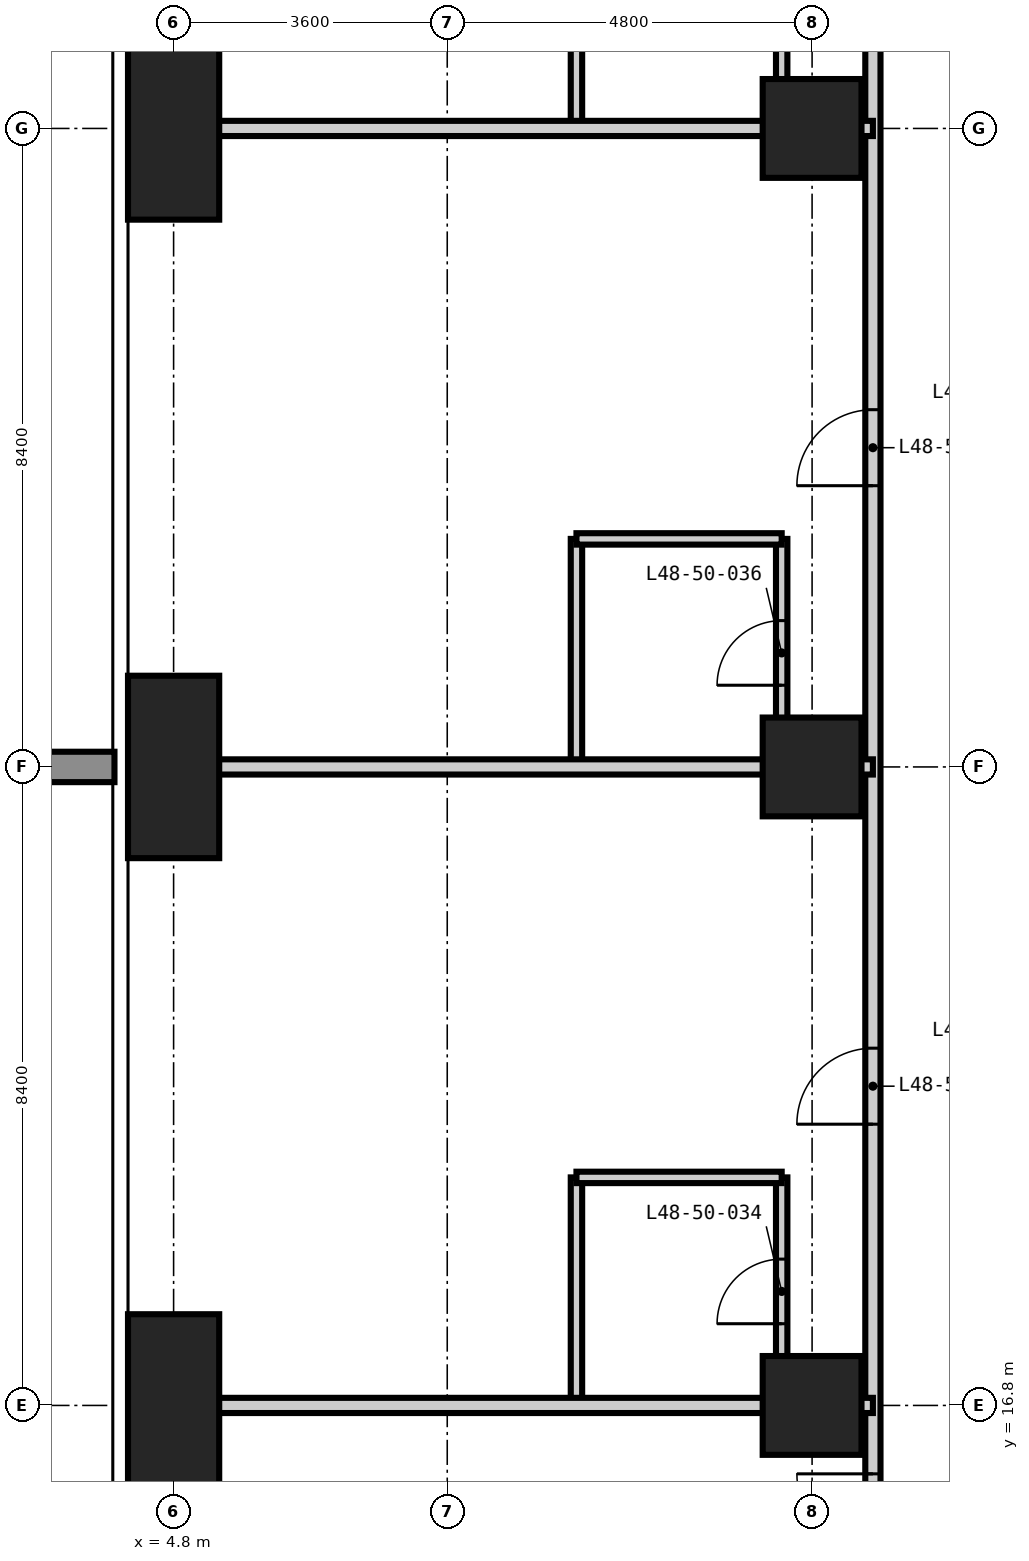
"""IFC4 building model, lengths in metres.
Left out: names, types, materials, properties, quantities, classifications, styles, units other than length and angle.
Written with IfcOpenShell. Run it as: python <this file> out.ifc"""

import sys

from ifc_helpers import new_model, si_unit, direction, frame, frame_2d, origin, origin_2d, place, context, subcontext, project, spatial, rectangle, extrude, element, fill, save


model = new_model("IFC4")
c1 = context("Model", 3, precision=1e-05, world=origin(), true_north=direction((0.0, 1.0)))
c2 = subcontext(c1, "Body", "Model", "MODEL_VIEW")
j1 = project(units=[si_unit("LENGTHUNIT", "METRE"), si_unit("PLANEANGLEUNIT", "RADIAN")], contexts=[c1])
p1 = place(None, origin())
s1 = spatial("IfcSite", under=j1, at=p1, CompositionType="ELEMENT")
p2 = place(p1, origin())
s2 = spatial("IfcBuilding", under=s1, at=p2, CompositionType="ELEMENT")
p3 = place(p2, frame((0.0, 0.0, 187.8)))
s3 = spatial("IfcBuildingStorey", under=s2, at=p3, CompositionType="ELEMENT", Elevation=187.8)
for number, where, z_axis, x_axis in (
    (1, (4.8, 16.8, -0.35), (0.0, 0.0, 1.0), (1.0, 0.0, 0.0)),
    (2, (4.8, 25.2, -0.35), (0.0, 0.0, 1.0), (1.0, 0.0, 0.0)),
    (3, (4.8, 33.6, -0.35), (0.0, 0.0, 1.0), (1.0, 0.0, 0.0)),
):
    element("IfcColumn", number, at=place(p3, frame(where, z_axis=z_axis, x_axis=x_axis)), inside=s3, PredefinedType="COLUMN", context=c2, shape_type="SweptSolid", body=[
        extrude(rectangle(XDim=1.2, YDim=2.4, at=origin_2d()), origin(), (0.0, 0.0, 1.0), 3.6),
    ])
for number, where, z_axis, x_axis in (
    (4, (13.2, 16.8, -0.35), (0.0, 0.0, 1.0), (1.0, 0.0, 0.0)),
    (5, (13.2, 25.2, -0.35), (0.0, 0.0, 1.0), (1.0, 0.0, 0.0)),
    (6, (13.2, 33.6, -0.35), (0.0, 0.0, 1.0), (1.0, 0.0, 0.0)),
):
    element("IfcColumn", number, at=place(p3, frame(where, z_axis=z_axis, x_axis=x_axis)), inside=s3, PredefinedType="COLUMN", context=c2, shape_type="SweptSolid", body=[
        extrude(rectangle(XDim=1.3, YDim=1.3, at=origin_2d()), origin(), (0.0, 0.0, 1.0), 3.6),
    ])
for number, where, z_axis, x_axis in (
    (7, (10.1, 16.8, 0.0), (0.0, 0.0, 1.0), (0.0, 1.0, 0.0)),
    (8, (10.1, 25.2, 0.0), (0.0, 0.0, 1.0), (0.0, 1.0, 0.0)),
    (9, (10.1, 33.6, 0.0), (0.0, 0.0, 1.0), (0.0, 1.0, 0.0)),
):
    element("IfcWall", number, at=place(p3, frame(where, z_axis=z_axis, x_axis=x_axis)), inside=s3, PredefinedType="PARTITIONING", context=c2, shape_type="SweptSolid", body=[
        extrude(rectangle(XDim=3.0, YDim=0.15, at=frame_2d((1.5, 0.0))), origin(), (0.0, 0.0, 1.0), 3.25),
    ])
p4 = place(p3, frame((12.8, 16.8, 0.0), z_axis=(0.0, 0.0, 1.0), x_axis=(0.0, 1.0, 0.0)))
e10 = element("IfcWall", 10, at=p4, inside=s3, PredefinedType="PARTITIONING", context=c2, shape_type="SweptSolid", body=[
    extrude(rectangle(XDim=3.0, YDim=0.15, at=frame_2d((1.5, 0.0))), origin(), (0.0, 0.0, 1.0), 3.25),
])
p5 = place(p4, frame((1.075, 0.0, 0.0)))
e11 = element("IfcOpeningElement", 11, at=p5, cuts=e10, PredefinedType="OPENING", context=c2, shape_type="SweptSolid", body=[
    extrude(rectangle(XDim=0.85, YDim=2.1, at=frame_2d((0.425, 1.05))), frame((0.0, 0.085, 0.0), z_axis=(0.0, -1.0, 0.0), x_axis=(1.0, 0.0, 0.0)), (0.0, 0.0, 1.0), 0.17),
])
p6 = place(p3, frame((12.8, 25.2, 0.0), z_axis=(0.0, 0.0, 1.0), x_axis=(0.0, 1.0, 0.0)))
e12 = element("IfcWall", 12, at=p6, inside=s3, PredefinedType="PARTITIONING", context=c2, shape_type="SweptSolid", body=[
    extrude(rectangle(XDim=3.0, YDim=0.15, at=frame_2d((1.5, 0.0))), origin(), (0.0, 0.0, 1.0), 3.25),
])
p7 = place(p6, frame((1.075, 0.0, 0.0)))
e13 = element("IfcOpeningElement", 13, at=p7, cuts=e12, PredefinedType="OPENING", context=c2, shape_type="SweptSolid", body=[
    extrude(rectangle(XDim=0.85, YDim=2.1, at=frame_2d((0.425, 1.05))), frame((0.0, 0.085, 0.0), z_axis=(0.0, -1.0, 0.0), x_axis=(1.0, 0.0, 0.0)), (0.0, 0.0, 1.0), 0.17),
])
p8 = place(p3, frame((12.8, 33.6, 0.0), z_axis=(0.0, 0.0, 1.0), x_axis=(0.0, 1.0, 0.0)))
e14 = element("IfcWall", 14, at=p8, inside=s3, PredefinedType="PARTITIONING", context=c2, shape_type="SweptSolid", body=[
    extrude(rectangle(XDim=3.0, YDim=0.15, at=frame_2d((1.5, 0.0))), origin(), (0.0, 0.0, 1.0), 3.25),
])
p9 = place(p8, frame((1.075, 0.0, 0.0)))
e15 = element("IfcOpeningElement", 15, at=p9, cuts=e14, PredefinedType="OPENING", context=c2, shape_type="SweptSolid", body=[
    extrude(rectangle(XDim=0.85, YDim=2.1, at=frame_2d((0.425, 1.05))), frame((0.0, 0.085, 0.0), z_axis=(0.0, -1.0, 0.0), x_axis=(1.0, 0.0, 0.0)), (0.0, 0.0, 1.0), 0.17),
])
for number, where, z_axis, x_axis in (
    (16, (10.1, 19.8, 0.0), (0.0, 0.0, 1.0), (1.0, 0.0, 0.0)),
    (17, (10.1, 28.2, 0.0), (0.0, 0.0, 1.0), (1.0, 0.0, 0.0)),
):
    element("IfcWall", number, at=place(p3, frame(where, z_axis=z_axis, x_axis=x_axis)), inside=s3, PredefinedType="PARTITIONING", context=c2, shape_type="SweptSolid", body=[
        extrude(rectangle(XDim=2.7, YDim=0.15, at=frame_2d((1.35, 0.0))), origin(), (0.0, 0.0, 1.0), 3.25),
    ])
p10 = place(p3, frame((14.0, 14.0, 0.0), z_axis=(0.0, 0.0, 1.0), x_axis=(0.0, 1.0, 0.0)))
e18 = element("IfcWall", 18, at=p10, inside=s3, PredefinedType="PARTITIONING", context=c2, shape_type="SweptSolid", body=[
    extrude(rectangle(XDim=30.2, YDim=0.2, at=frame_2d((15.1, 0.0))), origin(), (0.0, 0.0, 1.0), 3.25),
])
p11 = place(p10, frame((6.5, 0.0, 0.0)))
e19 = element("IfcOpeningElement", 19, at=p11, cuts=e18, PredefinedType="OPENING", context=c2, shape_type="SweptSolid", body=[
    extrude(rectangle(XDim=1.0, YDim=2.2, at=frame_2d((0.5, 1.1))), frame((0.0, 0.11, 0.0), z_axis=(0.0, -1.0, 0.0), x_axis=(1.0, 0.0, 0.0)), (0.0, 0.0, 1.0), 0.22),
])
p12 = place(p10, frame((14.9, 0.0, 0.0)))
e20 = element("IfcOpeningElement", 20, at=p12, cuts=e18, PredefinedType="OPENING", context=c2, shape_type="SweptSolid", body=[
    extrude(rectangle(XDim=1.0, YDim=2.2, at=frame_2d((0.5, 1.1))), frame((0.0, 0.11, 0.0), z_axis=(0.0, -1.0, 0.0), x_axis=(1.0, 0.0, 0.0)), (0.0, 0.0, 1.0), 0.22),
])
p13 = place(p10, frame((23.3, 0.0, 0.0)))
e21 = element("IfcOpeningElement", 21, at=p13, cuts=e18, PredefinedType="OPENING", context=c2, shape_type="SweptSolid", body=[
    extrude(rectangle(XDim=1.0, YDim=2.2, at=frame_2d((0.5, 1.1))), frame((0.0, 0.11, 0.0), z_axis=(0.0, -1.0, 0.0), x_axis=(1.0, 0.0, 0.0)), (0.0, 0.0, 1.0), 0.22),
])
p14 = place(p10, frame((0.9, 0.0, 0.0)))
e22 = element("IfcOpeningElement", 22, at=p14, cuts=e18, PredefinedType="OPENING", context=c2, shape_type="SweptSolid", body=[
    extrude(rectangle(XDim=1.0, YDim=2.2, at=frame_2d((0.5, 1.1))), frame((0.0, 0.11, 0.0), z_axis=(0.0, -1.0, 0.0), x_axis=(1.0, 0.0, 0.0)), (0.0, 0.0, 1.0), 0.22),
])
p15 = place(p10, frame((28.7, 0.0, 0.0)))
e23 = element("IfcOpeningElement", 23, at=p15, cuts=e18, PredefinedType="OPENING", context=c2, shape_type="SweptSolid", body=[
    extrude(rectangle(XDim=1.0, YDim=2.2, at=frame_2d((0.5, 1.1))), frame((0.0, 0.11, 0.0), z_axis=(0.0, -1.0, 0.0), x_axis=(1.0, 0.0, 0.0)), (0.0, 0.0, 1.0), 0.22),
])
for number, where, z_axis, x_axis in (
    (24, (4.182, 16.8, 0.0), (0.0, 0.0, 1.0), (1.0, 0.0, 0.0)),
    (25, (4.182, 25.2, 0.0), (0.0, 0.0, 1.0), (1.0, 0.0, 0.0)),
    (26, (4.182, 33.6, 0.0), (0.0, 0.0, 1.0), (1.0, 0.0, 0.0)),
):
    element("IfcWall", number, at=place(p3, frame(where, z_axis=z_axis, x_axis=x_axis)), inside=s3, PredefinedType="PARTITIONING", context=c2, shape_type="SweptSolid", body=[
        extrude(rectangle(XDim=9.818, YDim=0.2, at=frame_2d((4.909, 0.0))), origin(), (0.0, 0.0, 1.0), 3.25),
    ])
p16 = place(p11, origin())
e27 = element("IfcDoor", 27, at=p16, inside=s3, OperationType="SINGLE_SWING_LEFT", PredefinedType="DOOR", context=c2, shape_type="SweptSolid", body=[
    extrude(rectangle(XDim=1.0, YDim=2.2, at=frame_2d((0.5, 1.1))), frame((0.0, 0.025, 0.0), z_axis=(0.0, -1.0, 0.0), x_axis=(1.0, 0.0, 0.0)), (0.0, 0.0, 1.0), 0.05),
])
fill(e19, e27)
p17 = place(p5, origin())
e28 = element("IfcDoor", 28, at=p17, inside=s3, OperationType="SINGLE_SWING_LEFT", PredefinedType="DOOR", context=c2, shape_type="SweptSolid", body=[
    extrude(rectangle(XDim=0.85, YDim=2.1, at=frame_2d((0.425, 1.05))), frame((0.0, 0.025, 0.0), z_axis=(0.0, -1.0, 0.0), x_axis=(1.0, 0.0, 0.0)), (0.0, 0.0, 1.0), 0.05),
])
fill(e11, e28)
p18 = place(p12, origin())
e29 = element("IfcDoor", 29, at=p18, inside=s3, OperationType="SINGLE_SWING_LEFT", PredefinedType="DOOR", context=c2, shape_type="SweptSolid", body=[
    extrude(rectangle(XDim=1.0, YDim=2.2, at=frame_2d((0.5, 1.1))), frame((0.0, 0.025, 0.0), z_axis=(0.0, -1.0, 0.0), x_axis=(1.0, 0.0, 0.0)), (0.0, 0.0, 1.0), 0.05),
])
fill(e20, e29)
p19 = place(p7, origin())
e30 = element("IfcDoor", 30, at=p19, inside=s3, OperationType="SINGLE_SWING_LEFT", PredefinedType="DOOR", context=c2, shape_type="SweptSolid", body=[
    extrude(rectangle(XDim=0.85, YDim=2.1, at=frame_2d((0.425, 1.05))), frame((0.0, 0.025, 0.0), z_axis=(0.0, -1.0, 0.0), x_axis=(1.0, 0.0, 0.0)), (0.0, 0.0, 1.0), 0.05),
])
fill(e13, e30)
p20 = place(p14, origin())
e31 = element("IfcDoor", 31, at=p20, inside=s3, OperationType="SINGLE_SWING_RIGHT", PredefinedType="DOOR", context=c2, shape_type="SweptSolid", body=[
    extrude(rectangle(XDim=1.0, YDim=2.2, at=frame_2d((0.5, 1.1))), frame((0.0, 0.025, 0.0), z_axis=(0.0, -1.0, 0.0), x_axis=(1.0, 0.0, 0.0)), (0.0, 0.0, 1.0), 0.05),
])
fill(e22, e31)
save(model, sys.argv[1])
